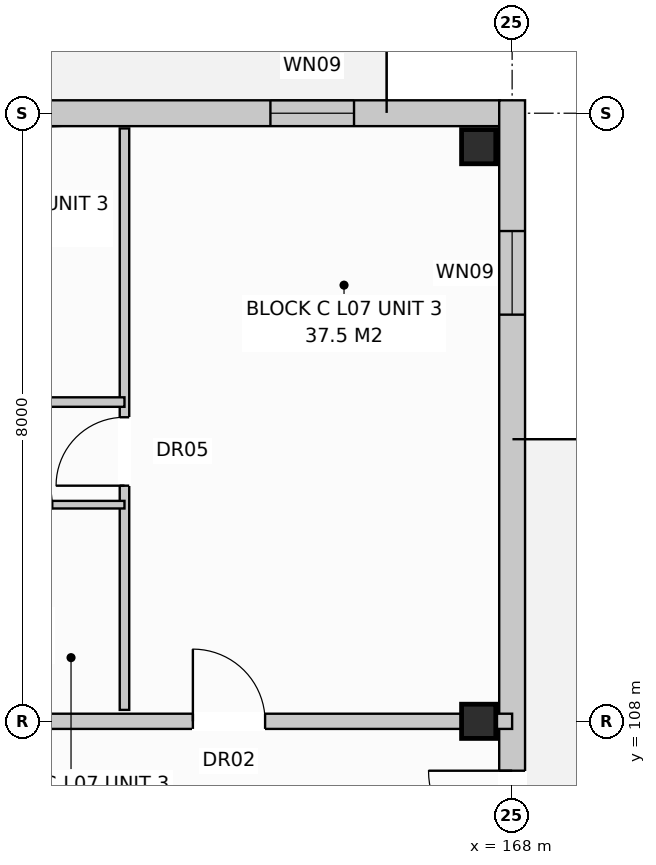
"""IFC4 building model, lengths in metres.
Left out: names, types, materials, properties, quantities, classifications, styles, units other than length and angle.
Written with IfcOpenShell. Run it as: python <this file> out.ifc"""

import sys

from ifc_helpers import new_model, si_unit, direction, frame, frame_2d, origin, origin_with_axes, origin_2d, place, context, subcontext, project, spatial, rectangle, extrude, element, fill, save


model = new_model("IFC4")
c1 = context("Model", 3, precision=1e-05, world=origin(), true_north=direction((0.0, 1.0)))
c2 = subcontext(c1, "Body", "Model", "MODEL_VIEW")
j1 = project(units=[si_unit("LENGTHUNIT", "METRE"), si_unit("PLANEANGLEUNIT", "RADIAN")], contexts=[c1])
p1 = place(None, origin())
s1 = spatial("IfcSite", under=j1, at=p1, CompositionType="ELEMENT")
p2 = place(p1, origin())
s2 = spatial("IfcBuilding", under=s1, at=p2, CompositionType="ELEMENT")
p3 = place(p2, frame((0.0, 0.0, 24.0)))
s3 = spatial("IfcBuildingStorey", under=s2, at=p3, CompositionType="ELEMENT", Elevation=24.0)
for number, where, z_axis, x_axis in (
    (1, (167.56, 108.0, 0.0), (0.0, 0.0, 1.0), (1.0, 0.0, 0.0)),
    (2, (167.56, 115.56, 0.0), (0.0, 0.0, 1.0), (1.0, 0.0, 0.0)),
):
    element("IfcColumn", number, at=place(p3, frame(where, z_axis=z_axis, x_axis=x_axis)), inside=s3, PredefinedType="COLUMN", context=c2, shape_type="SweptSolid", body=[
        extrude(rectangle(XDim=0.45, YDim=0.45, at=origin_2d()), origin(), (0.0, 0.0, 1.0), 3.2),
    ])
p4 = place(p3, frame((126.76, 116.0, 0.0), z_axis=(0.0, 0.0, 1.0), x_axis=(1.0, 0.0, 0.0)))
e3 = element("IfcWall", 3, at=p4, inside=s3, PredefinedType="STANDARD", context=c2, shape_type="SweptSolid", body=[
    extrude(rectangle(XDim=41.08, YDim=0.34, at=frame_2d((20.54, 0.0))), origin(), (0.0, 0.0, 1.0), 2.95),
])
p5 = place(p4, frame((4.911, 0.0, 0.0)))
e4 = element("IfcOpeningElement", 4, at=p5, cuts=e3, PredefinedType="OPENING", context=c2, shape_type="SweptSolid", body=[
    extrude(rectangle(XDim=0.95, YDim=2.1, at=frame_2d((0.475, 1.05))), frame((0.0, 0.182, 0.0), z_axis=(0.0, -1.0, 0.0), x_axis=(1.0, 0.0, 0.0)), (0.0, 0.0, 1.0), 0.364),
])
p6 = place(p4, frame((18.91, 0.0, 0.0)))
e5 = element("IfcOpeningElement", 5, at=p6, cuts=e3, PredefinedType="OPENING", context=c2, shape_type="SweptSolid", body=[
    extrude(rectangle(XDim=0.95, YDim=2.1, at=frame_2d((0.475, 1.05))), frame((0.0, 0.182, 0.0), z_axis=(0.0, -1.0, 0.0), x_axis=(1.0, 0.0, 0.0)), (0.0, 0.0, 1.0), 0.364),
])
p7 = place(p4, frame((30.411, 0.0, 0.0)))
e6 = element("IfcOpeningElement", 6, at=p7, cuts=e3, PredefinedType="OPENING", context=c2, shape_type="SweptSolid", body=[
    extrude(rectangle(XDim=0.95, YDim=2.1, at=frame_2d((0.475, 1.05))), frame((0.0, 0.182, 0.0), z_axis=(0.0, -1.0, 0.0), x_axis=(1.0, 0.0, 0.0)), (0.0, 0.0, 1.0), 0.364),
])
p8 = place(p4, frame((2.46, 0.0, 0.72)))
e7 = element("IfcOpeningElement", 7, at=p8, cuts=e3, PredefinedType="OPENING", context=c2, shape_type="SweptSolid", body=[
    extrude(rectangle(XDim=1.1, YDim=1.5, at=frame_2d((0.55, 0.75))), frame((0.0, 0.182, 0.0), z_axis=(0.0, -1.0, 0.0), x_axis=(1.0, 0.0, 0.0)), (0.0, 0.0, 1.0), 0.364),
])
p9 = place(p4, frame((7.81, 0.0, 0.8)))
e8 = element("IfcOpeningElement", 8, at=p9, cuts=e3, PredefinedType="OPENING", context=c2, shape_type="SweptSolid", body=[
    extrude(rectangle(XDim=1.8, YDim=1.7, at=frame_2d((0.9, 0.85))), frame((0.0, 0.182, 0.0), z_axis=(0.0, -1.0, 0.0), x_axis=(1.0, 0.0, 0.0)), (0.0, 0.0, 1.0), 0.364),
])
p10 = place(p4, frame((14.56, 0.0, 0.72)))
e9 = element("IfcOpeningElement", 9, at=p10, cuts=e3, PredefinedType="OPENING", context=c2, shape_type="SweptSolid", body=[
    extrude(rectangle(XDim=1.1, YDim=1.5, at=frame_2d((0.55, 0.75))), frame((0.0, 0.182, 0.0), z_axis=(0.0, -1.0, 0.0), x_axis=(1.0, 0.0, 0.0)), (0.0, 0.0, 1.0), 0.364),
])
p11 = place(p4, frame((16.76, 0.0, 0.8)))
e10 = element("IfcOpeningElement", 10, at=p11, cuts=e3, PredefinedType="OPENING", context=c2, shape_type="SweptSolid", body=[
    extrude(rectangle(XDim=1.9, YDim=1.85, at=frame_2d((0.95, 0.925))), frame((0.0, 0.182, 0.0), z_axis=(0.0, -1.0, 0.0), x_axis=(1.0, 0.0, 0.0)), (0.0, 0.0, 1.0), 0.364),
])
p12 = place(p4, frame((21.61, 0.0, 0.8)))
e11 = element("IfcOpeningElement", 11, at=p12, cuts=e3, PredefinedType="OPENING", context=c2, shape_type="SweptSolid", body=[
    extrude(rectangle(XDim=1.8, YDim=1.7, at=frame_2d((0.9, 0.85))), frame((0.0, 0.182, 0.0), z_axis=(0.0, -1.0, 0.0), x_axis=(1.0, 0.0, 0.0)), (0.0, 0.0, 1.0), 0.364),
])
p13 = place(p4, frame((25.36, 0.0, 0.72)))
e12 = element("IfcOpeningElement", 12, at=p13, cuts=e3, PredefinedType="OPENING", context=c2, shape_type="SweptSolid", body=[
    extrude(rectangle(XDim=1.1, YDim=1.5, at=frame_2d((0.55, 0.75))), frame((0.0, 0.182, 0.0), z_axis=(0.0, -1.0, 0.0), x_axis=(1.0, 0.0, 0.0)), (0.0, 0.0, 1.0), 0.364),
])
p14 = place(p4, frame((28.66, 0.0, 0.72)))
e13 = element("IfcOpeningElement", 13, at=p14, cuts=e3, PredefinedType="OPENING", context=c2, shape_type="SweptSolid", body=[
    extrude(rectangle(XDim=1.1, YDim=1.5, at=frame_2d((0.55, 0.75))), frame((0.0, 0.182, 0.0), z_axis=(0.0, -1.0, 0.0), x_axis=(1.0, 0.0, 0.0)), (0.0, 0.0, 1.0), 0.364),
])
p15 = place(p4, frame((32.01, 0.0, 0.8)))
e14 = element("IfcOpeningElement", 14, at=p15, cuts=e3, PredefinedType="OPENING", context=c2, shape_type="SweptSolid", body=[
    extrude(rectangle(XDim=1.8, YDim=1.7, at=frame_2d((0.9, 0.85))), frame((0.0, 0.182, 0.0), z_axis=(0.0, -1.0, 0.0), x_axis=(1.0, 0.0, 0.0)), (0.0, 0.0, 1.0), 0.364),
])
p16 = place(p4, frame((38.06, 0.0, 0.72)))
e15 = element("IfcOpeningElement", 15, at=p16, cuts=e3, PredefinedType="OPENING", context=c2, shape_type="SweptSolid", body=[
    extrude(rectangle(XDim=1.1, YDim=1.5, at=frame_2d((0.55, 0.75))), frame((0.0, 0.182, 0.0), z_axis=(0.0, -1.0, 0.0), x_axis=(1.0, 0.0, 0.0)), (0.0, 0.0, 1.0), 0.364),
])
p17 = place(p3, frame((168.0, 97.43, 0.0), z_axis=(0.0, 0.0, 1.0), x_axis=(0.0, 1.0, 0.0)))
e16 = element("IfcWall", 16, at=p17, inside=s3, PredefinedType="STANDARD", context=c2, shape_type="SweptSolid", body=[
    extrude(rectangle(XDim=18.74, YDim=0.34, at=frame_2d((9.37, 0.0))), origin(), (0.0, 0.0, 1.0), 2.95),
])
p18 = place(p17, frame((8.82, 0.0, 0.0)))
e17 = element("IfcOpeningElement", 17, at=p18, cuts=e16, PredefinedType="OPENING", context=c2, shape_type="SweptSolid", body=[
    extrude(rectangle(XDim=1.1, YDim=2.1, at=frame_2d((0.55, 1.05))), frame((0.0, 0.182, 0.0), z_axis=(0.0, -1.0, 0.0), x_axis=(1.0, 0.0, 0.0)), (0.0, 0.0, 1.0), 0.364),
])
p19 = place(p17, frame((1.72, 0.0, 0.72)))
e18 = element("IfcOpeningElement", 18, at=p19, cuts=e16, PredefinedType="OPENING", context=c2, shape_type="SweptSolid", body=[
    extrude(rectangle(XDim=1.1, YDim=1.5, at=frame_2d((0.55, 0.75))), frame((0.0, 0.182, 0.0), z_axis=(0.0, -1.0, 0.0), x_axis=(1.0, 0.0, 0.0)), (0.0, 0.0, 1.0), 0.364),
])
p20 = place(p17, frame((15.92, 0.0, 0.72)))
e19 = element("IfcOpeningElement", 19, at=p20, cuts=e16, PredefinedType="OPENING", context=c2, shape_type="SweptSolid", body=[
    extrude(rectangle(XDim=1.1, YDim=1.5, at=frame_2d((0.55, 0.75))), frame((0.0, 0.182, 0.0), z_axis=(0.0, -1.0, 0.0), x_axis=(1.0, 0.0, 0.0)), (0.0, 0.0, 1.0), 0.364),
])
p21 = place(p3, frame((154.2, 108.0, 0.0), z_axis=(0.0, 0.0, 1.0), x_axis=(1.0, 0.0, 0.0)))
e20 = element("IfcWall", 20, at=p21, inside=s3, PredefinedType="PARTITIONING", context=c2, shape_type="SweptSolid", body=[
    extrude(rectangle(XDim=13.8, YDim=0.2, at=frame_2d((6.9, 0.0))), origin(), (0.0, 0.0, 1.0), 2.39),
])
p22 = place(p21, frame((9.6, 0.0, 0.0)))
e21 = element("IfcOpeningElement", 21, at=p22, cuts=e20, PredefinedType="OPENING", context=c2, shape_type="SweptSolid", body=[
    extrude(rectangle(XDim=0.95, YDim=2.15, at=frame_2d((0.475, 1.075))), frame((0.0, 0.112, 0.0), z_axis=(0.0, -1.0, 0.0), x_axis=(1.0, 0.0, 0.0)), (0.0, 0.0, 1.0), 0.224),
])
p23 = place(p3, frame((162.9, 108.15, 0.0), z_axis=(0.0, 0.0, 1.0), x_axis=(0.0, 1.0, 0.0)))
e22 = element("IfcWall", 22, at=p23, inside=s3, PredefinedType="PARTITIONING", context=c2, shape_type="SweptSolid", body=[
    extrude(rectangle(XDim=7.65, YDim=0.125, at=frame_2d((3.825, 0.0))), origin(), (0.0, 0.0, 1.0), 2.95),
])
p24 = place(p23, frame((2.95, 0.0, 0.0)))
e23 = element("IfcOpeningElement", 23, at=p24, cuts=e22, PredefinedType="OPENING", context=c2, shape_type="SweptSolid", body=[
    extrude(rectangle(XDim=0.9, YDim=2.1, at=frame_2d((0.45, 1.05))), frame((0.0, 0.074, 0.0), z_axis=(0.0, -1.0, 0.0), x_axis=(1.0, 0.0, 0.0)), (0.0, 0.0, 1.0), 0.149),
])
p25 = place(p3, frame((154.3, 110.85, 0.0), z_axis=(0.0, 0.0, 1.0), x_axis=(1.0, 0.0, 0.0)))
e24 = element("IfcWall", 24, at=p25, inside=s3, PredefinedType="PARTITIONING", context=c2, shape_type="SweptSolid", body=[
    extrude(rectangle(XDim=8.6, YDim=0.1, at=frame_2d((4.3, 0.0))), origin(), (0.0, 0.0, 1.0), 2.95),
])
p26 = place(p25, frame((1.4, 0.0, 0.0)))
e25 = element("IfcOpeningElement", 25, at=p26, cuts=e24, PredefinedType="OPENING", context=c2, shape_type="SweptSolid", body=[
    extrude(rectangle(XDim=0.85, YDim=2.05, at=frame_2d((0.425, 1.025))), frame((0.0, 0.062, 0.0), z_axis=(0.0, -1.0, 0.0), x_axis=(1.0, 0.0, 0.0)), (0.0, 0.0, 1.0), 0.124),
])
p27 = place(p25, frame((4.65, 0.0, 0.0)))
e26 = element("IfcOpeningElement", 26, at=p27, cuts=e24, PredefinedType="OPENING", context=c2, shape_type="SweptSolid", body=[
    extrude(rectangle(XDim=0.85, YDim=2.05, at=frame_2d((0.425, 1.025))), frame((0.0, 0.062, 0.0), z_axis=(0.0, -1.0, 0.0), x_axis=(1.0, 0.0, 0.0)), (0.0, 0.0, 1.0), 0.124),
])
p28 = place(p25, frame((6.8, 0.0, 0.0)))
e27 = element("IfcOpeningElement", 27, at=p28, cuts=e24, PredefinedType="OPENING", context=c2, shape_type="SweptSolid", body=[
    extrude(rectangle(XDim=0.85, YDim=2.1, at=frame_2d((0.425, 1.05))), frame((0.0, 0.062, 0.0), z_axis=(0.0, -1.0, 0.0), x_axis=(1.0, 0.0, 0.0)), (0.0, 0.0, 1.0), 0.124),
])
p29 = place(p3, frame((158.4, 112.2, 0.0), z_axis=(0.0, 0.0, 1.0), x_axis=(1.0, 0.0, 0.0)))
e28 = element("IfcWall", 28, at=p29, inside=s3, PredefinedType="PARTITIONING", context=c2, shape_type="SweptSolid", body=[
    extrude(rectangle(XDim=4.5, YDim=0.125, at=frame_2d((2.25, 0.0))), origin(), (0.0, 0.0, 1.0), 2.95),
])
p30 = place(p29, frame((1.6, 0.0, 0.0)))
e29 = element("IfcOpeningElement", 29, at=p30, cuts=e28, PredefinedType="OPENING", context=c2, shape_type="SweptSolid", body=[
    extrude(rectangle(XDim=0.9, YDim=2.1, at=frame_2d((0.45, 1.05))), frame((0.0, 0.074, 0.0), z_axis=(0.0, -1.0, 0.0), x_axis=(1.0, 0.0, 0.0)), (0.0, 0.0, 1.0), 0.149),
])
p31 = place(p16, origin_with_axes())
e30 = element("IfcWindow", 30, at=p31, inside=s3, PartitioningType="SINGLE_PANEL", PredefinedType="WINDOW", context=c2, shape_type="SweptSolid", body=[
    extrude(rectangle(XDim=1.1, YDim=1.5, at=frame_2d((0.55, 0.75))), frame((0.0, 0.03, 0.0), z_axis=(0.0, -1.0, 0.0), x_axis=(1.0, 0.0, 0.0)), (0.0, 0.0, 1.0), 0.06),
])
fill(e15, e30)
p32 = place(p18, origin_with_axes())
e31 = element("IfcDoor", 31, at=p32, inside=s3, OperationType="SINGLE_SWING_RIGHT", PredefinedType="DOOR", context=c2, shape_type="SweptSolid", body=[
    extrude(rectangle(XDim=1.1, YDim=2.1, at=frame_2d((0.55, 1.05))), frame((0.0, 0.025, 0.0), z_axis=(0.0, -1.0, 0.0), x_axis=(1.0, 0.0, 0.0)), (0.0, 0.0, 1.0), 0.05),
])
fill(e17, e31)
p33 = place(p20, origin_with_axes())
e32 = element("IfcWindow", 32, at=p33, inside=s3, PartitioningType="SINGLE_PANEL", PredefinedType="WINDOW", context=c2, shape_type="SweptSolid", body=[
    extrude(rectangle(XDim=1.1, YDim=1.5, at=frame_2d((0.55, 0.75))), frame((0.0, 0.03, 0.0), z_axis=(0.0, -1.0, 0.0), x_axis=(1.0, 0.0, 0.0)), (0.0, 0.0, 1.0), 0.06),
])
fill(e19, e32)
p34 = place(p22, origin_with_axes())
e33 = element("IfcDoor", 33, at=p34, inside=s3, OperationType="SINGLE_SWING_LEFT", PredefinedType="DOOR", context=c2, shape_type="SweptSolid", body=[
    extrude(rectangle(XDim=0.95, YDim=2.15, at=frame_2d((0.475, 1.075))), frame((0.0, 0.025, 0.0), z_axis=(0.0, -1.0, 0.0), x_axis=(1.0, 0.0, 0.0)), (0.0, 0.0, 1.0), 0.05),
])
fill(e21, e33)
p35 = place(p24, origin_with_axes())
e34 = element("IfcDoor", 34, at=p35, inside=s3, OperationType="SINGLE_SWING_LEFT", PredefinedType="DOOR", context=c2, shape_type="SweptSolid", body=[
    extrude(rectangle(XDim=0.9, YDim=2.1, at=frame_2d((0.45, 1.05))), frame((0.0, 0.025, 0.0), z_axis=(0.0, -1.0, 0.0), x_axis=(1.0, 0.0, 0.0)), (0.0, 0.0, 1.0), 0.05),
])
fill(e23, e34)
p36 = place(p28, origin_with_axes())
e35 = element("IfcDoor", 35, at=p36, inside=s3, OperationType="SINGLE_SWING_LEFT", PredefinedType="DOOR", context=c2, shape_type="SweptSolid", body=[
    extrude(rectangle(XDim=0.85, YDim=2.1, at=frame_2d((0.425, 1.05))), frame((0.0, 0.025, 0.0), z_axis=(0.0, -1.0, 0.0), x_axis=(1.0, 0.0, 0.0)), (0.0, 0.0, 1.0), 0.05),
])
fill(e27, e35)
save(model, sys.argv[1])
